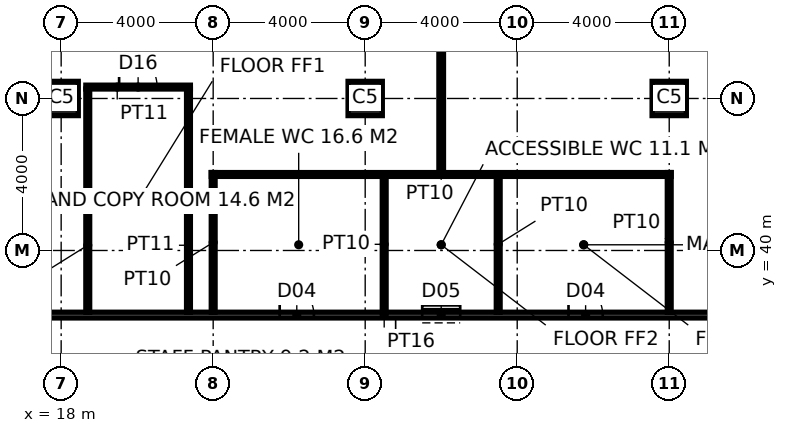
"""IFC4 building model, lengths in metres.
Left out: names, types, materials, properties, quantities, classifications, styles, units other than length and angle.
Written with IfcOpenShell. Run it as: python <this file> out.ifc"""

import sys

from ifc_helpers import new_model, si_unit, direction, frame, frame_2d, origin, origin_2d, place, context, subcontext, project, spatial, rectangle, hollow_rectangle, extrude, element, fill, save


model = new_model("IFC4")
c1 = context("Model", 3, precision=1e-05, world=origin(), true_north=direction((0.0, 1.0)))
c2 = subcontext(c1, "Body", "Model", "MODEL_VIEW")
j1 = project(units=[si_unit("LENGTHUNIT", "METRE"), si_unit("PLANEANGLEUNIT", "RADIAN")], contexts=[c1])
p1 = place(None, origin())
s1 = spatial("IfcSite", under=j1, at=p1, CompositionType="ELEMENT")
p2 = place(p1, origin())
s2 = spatial("IfcBuilding", under=s1, at=p2, CompositionType="ELEMENT")
p3 = place(p2, frame((0.0, 0.0, 179.8)))
s3 = spatial("IfcBuildingStorey", under=s2, at=p3, CompositionType="ELEMENT", Elevation=179.8)
for number, where, z_axis, x_axis in (
    (1, (18.0, 44.0, 0.0), (0.0, 0.0, 1.0), (1.0, 0.0, 0.0)),
    (2, (26.0, 44.0, 0.0), (0.0, 0.0, 1.0), (1.0, 0.0, 0.0)),
    (3, (34.0, 44.0, 0.0), (0.0, 0.0, 1.0), (1.0, 0.0, 0.0)),
):
    element("IfcColumn", number, at=place(p3, frame(where, z_axis=z_axis, x_axis=x_axis)), inside=s3, PredefinedType="COLUMN", context=c2, shape_type="SweptSolid", body=[
        extrude(hollow_rectangle(XDim=0.9, YDim=0.9, WallThickness=0.1, at=origin_2d()), origin(), (0.0, 0.0, 1.0), 4.0),
    ])
p4 = place(p3, frame((15.175, 38.3, 0.0), z_axis=(0.0, 0.0, 1.0), x_axis=(1.0, 0.0, 0.0)))
e4 = element("IfcWall", 4, at=p4, inside=s3, PredefinedType="PARTITIONING", context=c2, shape_type="SweptSolid", body=[
    extrude(rectangle(XDim=22.65, YDim=0.15, at=frame_2d((11.325, 0.0))), origin(), (0.0, 0.0, 1.0), 3.85),
])
p5 = place(p4, frame((8.575, 0.0, 0.0)))
e5 = element("IfcOpeningElement", 5, at=p5, cuts=e4, PredefinedType="OPENING", context=c2, shape_type="SweptSolid", body=[
    extrude(rectangle(XDim=0.9, YDim=2.1, at=frame_2d((0.45, 1.05))), frame((0.0, 0.085, 0.0), z_axis=(0.0, -1.0, 0.0), x_axis=(1.0, 0.0, 0.0)), (0.0, 0.0, 1.0), 0.17),
])
p6 = place(p4, frame((12.325, 0.0, 0.0)))
e6 = element("IfcOpeningElement", 6, at=p6, cuts=e4, PredefinedType="OPENING", context=c2, shape_type="SweptSolid", body=[
    extrude(rectangle(XDim=1.0, YDim=2.1, at=frame_2d((0.5, 1.05))), frame((0.0, 0.085, 0.0), z_axis=(0.0, -1.0, 0.0), x_axis=(1.0, 0.0, 0.0)), (0.0, 0.0, 1.0), 0.17),
])
p7 = place(p4, frame((16.175, 0.0, 0.0)))
e7 = element("IfcOpeningElement", 7, at=p7, cuts=e4, PredefinedType="OPENING", context=c2, shape_type="SweptSolid", body=[
    extrude(rectangle(XDim=0.9, YDim=2.1, at=frame_2d((0.45, 1.05))), frame((0.0, 0.085, 0.0), z_axis=(0.0, -1.0, 0.0), x_axis=(1.0, 0.0, 0.0)), (0.0, 0.0, 1.0), 0.17),
])
for number, where, z_axis, x_axis in (
    (8, (22.0, 38.375, 0.0), (0.0, 0.0, 1.0), (0.0, 1.0, 0.0)),
    (9, (34.0, 38.375, 0.0), (0.0, 0.0, 1.0), (0.0, 1.0, 0.0)),
):
    element("IfcWall", number, at=place(p3, frame(where, z_axis=z_axis, x_axis=x_axis)), inside=s3, PredefinedType="PARTITIONING", context=c2, shape_type="SweptSolid", body=[
        extrude(rectangle(XDim=3.675, YDim=0.1, at=frame_2d((1.837, 0.0))), origin(), (0.0, 0.0, 1.0), 2.95),
    ])
p8 = place(p3, frame((21.95, 42.0, 0.0), z_axis=(0.0, 0.0, 1.0), x_axis=(1.0, 0.0, 0.0)))
e10 = element("IfcWall", 10, at=p8, inside=s3, PredefinedType="PARTITIONING", context=c2, shape_type="SweptSolid", body=[
    extrude(rectangle(XDim=12.1, YDim=0.1, at=frame_2d((6.05, 0.0))), origin(), (0.0, 0.0, 1.0), 3.85),
])
for number, where, z_axis, x_axis in (
    (11, (26.5, 38.375, 0.0), (0.0, 0.0, 1.0), (0.0, 1.0, 0.0)),
    (12, (29.5, 38.375, 0.0), (0.0, 0.0, 1.0), (0.0, 1.0, 0.0)),
):
    element("IfcWall", number, at=place(p3, frame(where, z_axis=z_axis, x_axis=x_axis)), inside=s3, PredefinedType="PARTITIONING", context=c2, shape_type="SweptSolid", body=[
        extrude(rectangle(XDim=3.575, YDim=0.1, at=frame_2d((1.788, 0.0))), origin(), (0.0, 0.0, 1.0), 3.85),
    ])
p9 = place(p3, frame((28.0, 42.05, 0.0), z_axis=(0.0, 0.0, 1.0), x_axis=(0.0, 1.0, 0.0)))
e13 = element("IfcWall", 13, at=p9, inside=s3, PredefinedType="PARTITIONING", context=c2, shape_type="SweptSolid", body=[
    extrude(rectangle(XDim=13.65, YDim=0.12, at=frame_2d((6.825, 0.0))), origin(), (0.0, 0.0, 1.0), 3.85),
])
p10 = place(p3, frame((18.65, 44.3, 0.0), z_axis=(0.0, 0.0, 1.0), x_axis=(1.0, 0.0, 0.0)))
e14 = element("IfcWall", 14, at=p10, inside=s3, PredefinedType="PARTITIONING", context=c2, shape_type="SweptSolid", body=[
    extrude(rectangle(XDim=2.75, YDim=0.1, at=frame_2d((1.375, 0.0))), origin(), (0.0, 0.0, 1.0), 3.85),
])
p11 = place(p10, frame((0.875, 0.0, 0.0)))
e15 = element("IfcOpeningElement", 15, at=p11, cuts=e14, PredefinedType="OPENING", context=c2, shape_type="SweptSolid", body=[
    extrude(rectangle(XDim=1.0, YDim=2.2, at=frame_2d((0.5, 1.1))), frame((0.0, 0.06, 0.0), z_axis=(0.0, -1.0, 0.0), x_axis=(1.0, 0.0, 0.0)), (0.0, 0.0, 1.0), 0.12),
])
for number, where, z_axis, x_axis in (
    (16, (18.7, 38.375, 0.0), (0.0, 0.0, 1.0), (0.0, 1.0, 0.0)),
    (17, (21.35, 38.375, 0.0), (0.0, 0.0, 1.0), (0.0, 1.0, 0.0)),
):
    element("IfcWall", number, at=place(p3, frame(where, z_axis=z_axis, x_axis=x_axis)), inside=s3, PredefinedType="PARTITIONING", context=c2, shape_type="SweptSolid", body=[
        extrude(rectangle(XDim=5.875, YDim=0.1, at=frame_2d((2.938, 0.0))), origin(), (0.0, 0.0, 1.0), 3.85),
    ])
p12 = place(p5, origin())
e18 = element("IfcDoor", 18, at=p12, inside=s3, OperationType="SINGLE_SWING_LEFT", PredefinedType="DOOR", context=c2, shape_type="SweptSolid", body=[
    extrude(rectangle(XDim=0.9, YDim=2.1, at=frame_2d((0.45, 1.05))), frame((0.0, 0.025, 0.0), z_axis=(0.0, -1.0, 0.0), x_axis=(1.0, 0.0, 0.0)), (0.0, 0.0, 1.0), 0.05),
])
fill(e5, e18)
p13 = place(p6, origin())
e19 = element("IfcDoor", 19, at=p13, inside=s3, OperationType="SLIDING_TO_LEFT", PredefinedType="DOOR", context=c2, shape_type="SweptSolid", body=[
    extrude(rectangle(XDim=1.0, YDim=2.1, at=frame_2d((0.5, 1.05))), frame((0.0, 0.025, 0.0), z_axis=(0.0, -1.0, 0.0), x_axis=(1.0, 0.0, 0.0)), (0.0, 0.0, 1.0), 0.05),
])
fill(e6, e19)
p14 = place(p7, origin())
e20 = element("IfcDoor", 20, at=p14, inside=s3, OperationType="SINGLE_SWING_LEFT", PredefinedType="DOOR", context=c2, shape_type="SweptSolid", body=[
    extrude(rectangle(XDim=0.9, YDim=2.1, at=frame_2d((0.45, 1.05))), frame((0.0, 0.025, 0.0), z_axis=(0.0, -1.0, 0.0), x_axis=(1.0, 0.0, 0.0)), (0.0, 0.0, 1.0), 0.05),
])
fill(e7, e20)
p15 = place(p11, origin())
e21 = element("IfcDoor", 21, at=p15, inside=s3, OperationType="SINGLE_SWING_LEFT", PredefinedType="DOOR", context=c2, shape_type="SweptSolid", body=[
    extrude(rectangle(XDim=1.0, YDim=2.2, at=frame_2d((0.5, 1.1))), frame((0.0, 0.025, 0.0), z_axis=(0.0, -1.0, 0.0), x_axis=(1.0, 0.0, 0.0)), (0.0, 0.0, 1.0), 0.05),
])
fill(e15, e21)
save(model, sys.argv[1])
